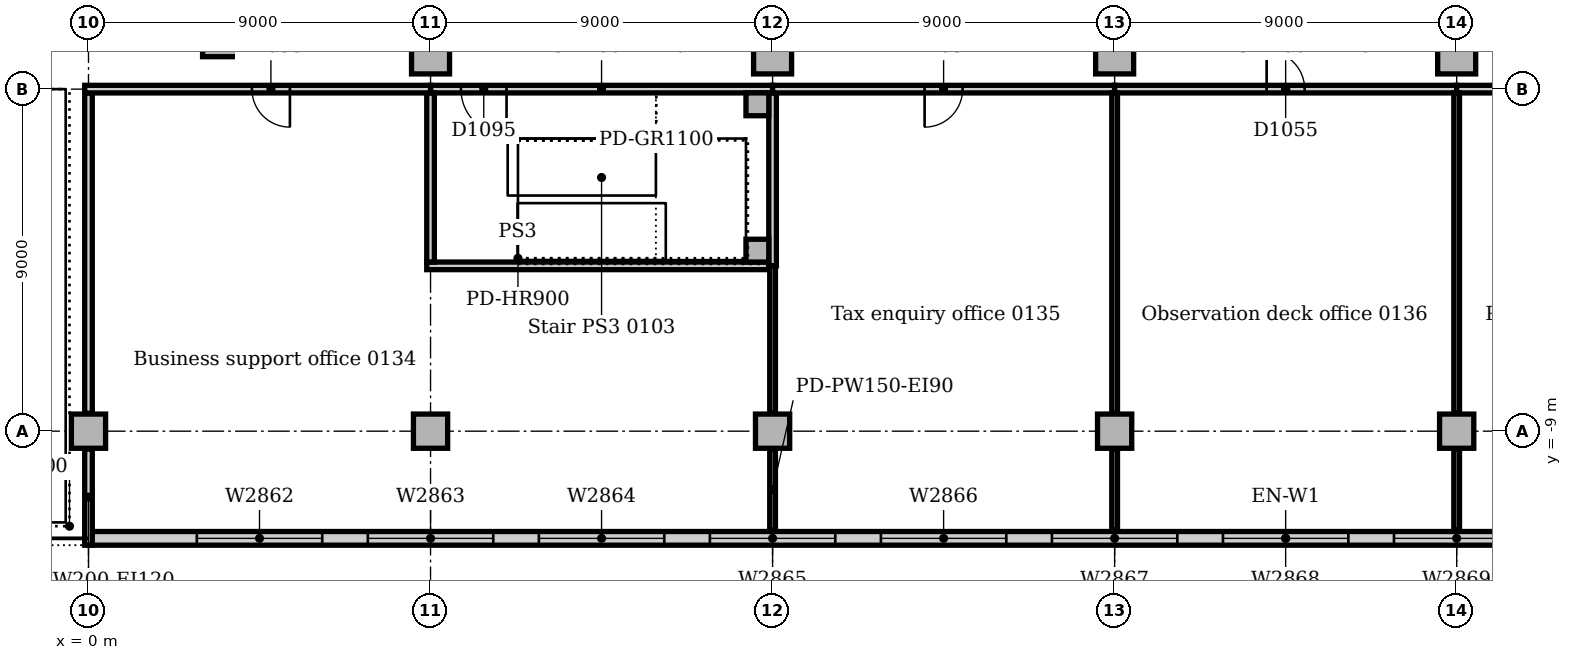
"""IFC4 building model, lengths in metres.
Left out: names, types, materials, properties, quantities, classifications, styles, units other than length and angle.
Written with IfcOpenShell. Run it as: python <this file> out.ifc"""

import sys

from ifc_helpers import new_model, si_unit, direction, frame, frame_2d, origin, origin_2d, place, context, subcontext, project, spatial, rectangle, extrude, element, fill, save


model = new_model("IFC4")
c1 = context("Model", 3, precision=1e-05, world=origin(), true_north=direction((0.0, 1.0)))
c2 = subcontext(c1, "Body", "Model", "MODEL_VIEW")
j1 = project(units=[si_unit("LENGTHUNIT", "METRE"), si_unit("PLANEANGLEUNIT", "RADIAN")], contexts=[c1])
p1 = place(None, origin())
s1 = spatial("IfcSite", under=j1, at=p1, CompositionType="ELEMENT")
p2 = place(p1, origin())
s2 = spatial("IfcBuilding", under=s1, at=p2, CompositionType="ELEMENT")
p3 = place(p2, frame((0.0, 0.0, 6.0)))
s3 = spatial("IfcBuildingStorey", under=s2, at=p3, CompositionType="ELEMENT", Elevation=6.0)
p4 = place(p3, frame((3.602, 1.453, 0.0), z_axis=(0.0, 0.0, 1.0), x_axis=(1.0, 0.0, 0.0)))
e1 = element("IfcColumn", 1, at=p4, inside=s3, PredefinedType="COLUMN", context=c2, shape_type="SweptSolid", body=[
    extrude(rectangle(XDim=1.2, YDim=1.2, at=origin_2d()), origin(), (0.0, 0.0, 1.0), 4.7),
])
for number, where, z_axis, x_axis in (
    (2, (9.0, 0.9, 0.0), (0.0, 0.0, 1.0), (1.0, 0.0, 0.0)),
    (3, (18.0, 0.9, 0.0), (0.0, 0.0, 1.0), (1.0, 0.0, 0.0)),
    (4, (27.0, 0.9, 0.0), (0.0, 0.0, 1.0), (1.0, 0.0, 0.0)),
    (5, (36.0, 0.9, 0.0), (0.0, 0.0, 1.0), (1.0, 0.0, 0.0)),
):
    element("IfcColumn", number, at=place(p3, frame(where, z_axis=z_axis, x_axis=x_axis)), inside=s3, PredefinedType="COLUMN", context=c2, shape_type="SweptSolid", body=[
        extrude(rectangle(XDim=1.0, YDim=1.0, at=origin_2d()), origin(), (0.0, 0.0, 1.0), 4.7),
    ])
for number, where, z_axis, x_axis in (
    (6, (0.0, -9.0, 0.0), (0.0, 0.0, 1.0), (1.0, 0.0, 0.0)),
    (7, (9.0, -9.0, 0.0), (0.0, 0.0, 1.0), (1.0, 0.0, 0.0)),
    (8, (18.0, -9.0, 0.0), (0.0, 0.0, 1.0), (1.0, 0.0, 0.0)),
    (9, (27.0, -9.0, 0.0), (0.0, 0.0, 1.0), (1.0, 0.0, 0.0)),
    (10, (36.0, -9.0, 0.0), (0.0, 0.0, 1.0), (1.0, 0.0, 0.0)),
):
    element("IfcColumn", number, at=place(p3, frame(where, z_axis=z_axis, x_axis=x_axis)), inside=s3, PredefinedType="COLUMN", context=c2, shape_type="SweptSolid", body=[
        extrude(rectangle(XDim=0.9, YDim=0.9, at=origin_2d()), origin(), (0.0, 0.0, 1.0), 4.7),
    ])
p5 = place(p3, frame((0.0, -11.82, 0.0), z_axis=(0.0, 0.0, 1.0), x_axis=(1.0, 0.0, 0.0)))
e11 = element("IfcWall", 11, at=p5, inside=s3, PredefinedType="STANDARD", context=c2, shape_type="SweptSolid", body=[
    extrude(rectangle(XDim=63.0, YDim=0.36, at=frame_2d((31.5, 0.0))), origin(), (0.0, 0.0, 1.0), 4.7),
])
p6 = place(p5, frame((2.85, 0.0, 0.9)))
e12 = element("IfcOpeningElement", 12, at=p6, cuts=e11, PredefinedType="OPENING", context=c2, shape_type="SweptSolid", body=[
    extrude(rectangle(XDim=3.3, YDim=2.4, at=frame_2d((1.65, 1.2))), frame((0.0, 0.19, 0.0), z_axis=(0.0, -1.0, 0.0), x_axis=(1.0, 0.0, 0.0)), (0.0, 0.0, 1.0), 0.38),
])
p7 = place(p5, frame((7.35, 0.0, 0.9)))
e13 = element("IfcOpeningElement", 13, at=p7, cuts=e11, PredefinedType="OPENING", context=c2, shape_type="SweptSolid", body=[
    extrude(rectangle(XDim=3.3, YDim=2.4, at=frame_2d((1.65, 1.2))), frame((0.0, 0.19, 0.0), z_axis=(0.0, -1.0, 0.0), x_axis=(1.0, 0.0, 0.0)), (0.0, 0.0, 1.0), 0.38),
])
p8 = place(p5, frame((11.85, 0.0, 0.9)))
e14 = element("IfcOpeningElement", 14, at=p8, cuts=e11, PredefinedType="OPENING", context=c2, shape_type="SweptSolid", body=[
    extrude(rectangle(XDim=3.3, YDim=2.4, at=frame_2d((1.65, 1.2))), frame((0.0, 0.19, 0.0), z_axis=(0.0, -1.0, 0.0), x_axis=(1.0, 0.0, 0.0)), (0.0, 0.0, 1.0), 0.38),
])
p9 = place(p5, frame((16.35, 0.0, 0.9)))
e15 = element("IfcOpeningElement", 15, at=p9, cuts=e11, PredefinedType="OPENING", context=c2, shape_type="SweptSolid", body=[
    extrude(rectangle(XDim=3.3, YDim=2.4, at=frame_2d((1.65, 1.2))), frame((0.0, 0.19, 0.0), z_axis=(0.0, -1.0, 0.0), x_axis=(1.0, 0.0, 0.0)), (0.0, 0.0, 1.0), 0.38),
])
p10 = place(p5, frame((20.85, 0.0, 0.9)))
e16 = element("IfcOpeningElement", 16, at=p10, cuts=e11, PredefinedType="OPENING", context=c2, shape_type="SweptSolid", body=[
    extrude(rectangle(XDim=3.3, YDim=2.4, at=frame_2d((1.65, 1.2))), frame((0.0, 0.19, 0.0), z_axis=(0.0, -1.0, 0.0), x_axis=(1.0, 0.0, 0.0)), (0.0, 0.0, 1.0), 0.38),
])
p11 = place(p5, frame((25.35, 0.0, 0.9)))
e17 = element("IfcOpeningElement", 17, at=p11, cuts=e11, PredefinedType="OPENING", context=c2, shape_type="SweptSolid", body=[
    extrude(rectangle(XDim=3.3, YDim=2.4, at=frame_2d((1.65, 1.2))), frame((0.0, 0.19, 0.0), z_axis=(0.0, -1.0, 0.0), x_axis=(1.0, 0.0, 0.0)), (0.0, 0.0, 1.0), 0.38),
])
p12 = place(p5, frame((29.85, 0.0, 0.9)))
e18 = element("IfcOpeningElement", 18, at=p12, cuts=e11, PredefinedType="OPENING", context=c2, shape_type="SweptSolid", body=[
    extrude(rectangle(XDim=3.3, YDim=2.4, at=frame_2d((1.65, 1.2))), frame((0.0, 0.19, 0.0), z_axis=(0.0, -1.0, 0.0), x_axis=(1.0, 0.0, 0.0)), (0.0, 0.0, 1.0), 0.38),
])
p13 = place(p5, frame((34.35, 0.0, 0.9)))
e19 = element("IfcOpeningElement", 19, at=p13, cuts=e11, PredefinedType="OPENING", context=c2, shape_type="SweptSolid", body=[
    extrude(rectangle(XDim=3.3, YDim=2.4, at=frame_2d((1.65, 1.2))), frame((0.0, 0.19, 0.0), z_axis=(0.0, -1.0, 0.0), x_axis=(1.0, 0.0, 0.0)), (0.0, 0.0, 1.0), 0.38),
])
p14 = place(p5, frame((38.85, 0.0, 0.9)))
e20 = element("IfcOpeningElement", 20, at=p14, cuts=e11, PredefinedType="OPENING", context=c2, shape_type="SweptSolid", body=[
    extrude(rectangle(XDim=3.3, YDim=2.4, at=frame_2d((1.65, 1.2))), frame((0.0, 0.19, 0.0), z_axis=(0.0, -1.0, 0.0), x_axis=(1.0, 0.0, 0.0)), (0.0, 0.0, 1.0), 0.38),
])
p15 = place(p5, frame((43.35, 0.0, 0.9)))
e21 = element("IfcOpeningElement", 21, at=p15, cuts=e11, PredefinedType="OPENING", context=c2, shape_type="SweptSolid", body=[
    extrude(rectangle(XDim=3.3, YDim=2.4, at=frame_2d((1.65, 1.2))), frame((0.0, 0.19, 0.0), z_axis=(0.0, -1.0, 0.0), x_axis=(1.0, 0.0, 0.0)), (0.0, 0.0, 1.0), 0.38),
])
p16 = place(p5, frame((47.85, 0.0, 0.9)))
e22 = element("IfcOpeningElement", 22, at=p16, cuts=e11, PredefinedType="OPENING", context=c2, shape_type="SweptSolid", body=[
    extrude(rectangle(XDim=3.3, YDim=2.4, at=frame_2d((1.65, 1.2))), frame((0.0, 0.19, 0.0), z_axis=(0.0, -1.0, 0.0), x_axis=(1.0, 0.0, 0.0)), (0.0, 0.0, 1.0), 0.38),
])
p17 = place(p5, frame((52.35, 0.0, 0.9)))
e23 = element("IfcOpeningElement", 23, at=p17, cuts=e11, PredefinedType="OPENING", context=c2, shape_type="SweptSolid", body=[
    extrude(rectangle(XDim=3.3, YDim=2.4, at=frame_2d((1.65, 1.2))), frame((0.0, 0.19, 0.0), z_axis=(0.0, -1.0, 0.0), x_axis=(1.0, 0.0, 0.0)), (0.0, 0.0, 1.0), 0.38),
])
p18 = place(p5, frame((56.85, 0.0, 0.9)))
e24 = element("IfcOpeningElement", 24, at=p18, cuts=e11, PredefinedType="OPENING", context=c2, shape_type="SweptSolid", body=[
    extrude(rectangle(XDim=3.3, YDim=2.4, at=frame_2d((1.65, 1.2))), frame((0.0, 0.19, 0.0), z_axis=(0.0, -1.0, 0.0), x_axis=(1.0, 0.0, 0.0)), (0.0, 0.0, 1.0), 0.38),
])
for number, where, z_axis, x_axis in (
    (25, (17.6, -4.25, 0.0), (0.0, 0.0, 1.0), (1.0, 0.0, 0.0)),
    (26, (17.6, -0.4, 0.0), (0.0, 0.0, 1.0), (1.0, 0.0, 0.0)),
):
    element("IfcColumn", number, at=place(p3, frame(where, z_axis=z_axis, x_axis=x_axis)), inside=s3, PredefinedType="COLUMN", context=c2, shape_type="SweptSolid", body=[
        extrude(rectangle(XDim=0.6, YDim=0.6, at=origin_2d()), origin(), (0.0, 0.0, 1.0), 5.0),
    ])
p19 = place(p3, frame((9.0, 0.0, 0.0), z_axis=(0.0, 0.0, 1.0), x_axis=(1.0, 0.0, 0.0)))
e27 = element("IfcWall", 27, at=p19, inside=s3, PredefinedType="SOLIDWALL", context=c2, shape_type="SweptSolid", body=[
    extrude(rectangle(XDim=9.0, YDim=0.2, at=frame_2d((4.5, 0.0))), origin(), (0.0, 0.0, 1.0), 4.7),
])
p20 = place(p19, frame((0.8, 0.0, 0.0)))
e28 = element("IfcOpeningElement", 28, at=p20, cuts=e27, PredefinedType="OPENING", context=c2, shape_type="SweptSolid", body=[
    extrude(rectangle(XDim=1.2, YDim=2.1, at=frame_2d((0.6, 1.05))), frame((0.0, 0.11, 0.0), z_axis=(0.0, -1.0, 0.0), x_axis=(1.0, 0.0, 0.0)), (0.0, 0.0, 1.0), 0.22),
])
p21 = place(p3, frame((8.9, -4.65, 0.0), z_axis=(0.0, 0.0, 1.0), x_axis=(1.0, 0.0, 0.0)))
e29 = element("IfcWall", 29, at=p21, inside=s3, PredefinedType="SOLIDWALL", context=c2, shape_type="SweptSolid", body=[
    extrude(rectangle(XDim=9.0, YDim=0.2, at=frame_2d((4.5, 0.0))), origin(), (0.0, 0.0, 1.0), 4.7),
])
p22 = place(p3, frame((9.0, -4.55, 0.0), z_axis=(0.0, 0.0, 1.0), x_axis=(0.0, 1.0, 0.0)))
e30 = element("IfcWall", 30, at=p22, inside=s3, PredefinedType="SOLIDWALL", context=c2, shape_type="SweptSolid", body=[
    extrude(rectangle(XDim=4.45, YDim=0.2, at=frame_2d((2.225, 0.0))), origin(), (0.0, 0.0, 1.0), 4.7),
])
p23 = place(p3, frame((18.0, -4.65, 0.0), z_axis=(0.0, 0.0, 1.0), x_axis=(0.0, 1.0, 0.0)))
e31 = element("IfcWall", 31, at=p23, inside=s3, PredefinedType="SOLIDWALL", context=c2, shape_type="SweptSolid", body=[
    extrude(rectangle(XDim=4.55, YDim=0.2, at=frame_2d((2.275, 0.0))), origin(), (0.0, 0.0, 1.0), 4.7),
])
p24 = place(p3, frame((0.0, -12.0, 0.0), z_axis=(0.0, 0.0, 1.0), x_axis=(0.0, 1.0, 0.0)))
e32 = element("IfcWall", 32, at=p24, inside=s3, PredefinedType="PARTITIONING", context=c2, shape_type="SweptSolid", body=[
    extrude(rectangle(XDim=2.53, YDim=0.2, at=frame_2d((1.265, 0.0))), origin(), (0.0, 0.0, 1.0), 4.7),
])
p25 = place(p3, frame((0.0, -8.53, 0.0), z_axis=(0.0, 0.0, 1.0), x_axis=(0.0, 1.0, 0.0)))
e33 = element("IfcWall", 33, at=p25, inside=s3, PredefinedType="PARTITIONING", context=c2, shape_type="SweptSolid", body=[
    extrude(rectangle(XDim=8.43, YDim=0.2, at=frame_2d((4.215, 0.0))), origin(), (0.0, 0.0, 1.0), 4.7),
])
p26 = place(p3, frame((-0.1, 0.0, 0.0), z_axis=(0.0, 0.0, 1.0), x_axis=(1.0, 0.0, 0.0)))
e34 = element("IfcWall", 34, at=p26, inside=s3, PredefinedType="PARTITIONING", context=c2, shape_type="SweptSolid", body=[
    extrude(rectangle(XDim=9.1, YDim=0.2, at=frame_2d((4.55, 0.0))), origin(), (0.0, 0.0, 1.0), 4.7),
])
p27 = place(p26, frame((4.4, 0.0, 0.0)))
e35 = element("IfcOpeningElement", 35, at=p27, cuts=e34, PredefinedType="OPENING", context=c2, shape_type="SweptSolid", body=[
    extrude(rectangle(XDim=1.0, YDim=2.1, at=frame_2d((0.5, 1.05))), frame((0.0, 0.11, 0.0), z_axis=(0.0, -1.0, 0.0), x_axis=(1.0, 0.0, 0.0)), (0.0, 0.0, 1.0), 0.22),
])
p28 = place(p3, frame((18.0, 0.0, 0.0), z_axis=(0.0, 0.0, 1.0), x_axis=(1.0, 0.0, 0.0)))
e36 = element("IfcWall", 36, at=p28, inside=s3, PredefinedType="PARTITIONING", context=c2, shape_type="SweptSolid", body=[
    extrude(rectangle(XDim=9.0, YDim=0.2, at=frame_2d((4.5, 0.0))), origin(), (0.0, 0.0, 1.0), 4.7),
])
p29 = place(p28, frame((4.0, 0.0, 0.0)))
e37 = element("IfcOpeningElement", 37, at=p29, cuts=e36, PredefinedType="OPENING", context=c2, shape_type="SweptSolid", body=[
    extrude(rectangle(XDim=1.0, YDim=2.1, at=frame_2d((0.5, 1.05))), frame((0.0, 0.11, 0.0), z_axis=(0.0, -1.0, 0.0), x_axis=(1.0, 0.0, 0.0)), (0.0, 0.0, 1.0), 0.22),
])
p30 = place(p3, frame((27.0, 0.0, 0.0), z_axis=(0.0, 0.0, 1.0), x_axis=(1.0, 0.0, 0.0)))
e38 = element("IfcWall", 38, at=p30, inside=s3, PredefinedType="PARTITIONING", context=c2, shape_type="SweptSolid", body=[
    extrude(rectangle(XDim=9.0, YDim=0.2, at=frame_2d((4.5, 0.0))), origin(), (0.0, 0.0, 1.0), 4.7),
])
p31 = place(p30, frame((4.0, 0.0, 0.0)))
e39 = element("IfcOpeningElement", 39, at=p31, cuts=e38, PredefinedType="OPENING", context=c2, shape_type="SweptSolid", body=[
    extrude(rectangle(XDim=1.0, YDim=2.1, at=frame_2d((0.5, 1.05))), frame((0.0, 0.11, 0.0), z_axis=(0.0, -1.0, 0.0), x_axis=(1.0, 0.0, 0.0)), (0.0, 0.0, 1.0), 0.22),
])
p32 = place(p3, frame((36.0, 0.0, 0.0), z_axis=(0.0, 0.0, 1.0), x_axis=(1.0, 0.0, 0.0)))
e40 = element("IfcWall", 40, at=p32, inside=s3, PredefinedType="PARTITIONING", context=c2, shape_type="SweptSolid", body=[
    extrude(rectangle(XDim=9.0, YDim=0.2, at=frame_2d((4.5, 0.0))), origin(), (0.0, 0.0, 1.0), 4.7),
])
p33 = place(p32, frame((4.0, 0.0, 0.0)))
e41 = element("IfcOpeningElement", 41, at=p33, cuts=e40, PredefinedType="OPENING", context=c2, shape_type="SweptSolid", body=[
    extrude(rectangle(XDim=1.0, YDim=2.1, at=frame_2d((0.5, 1.05))), frame((0.0, 0.11, 0.0), z_axis=(0.0, -1.0, 0.0), x_axis=(1.0, 0.0, 0.0)), (0.0, 0.0, 1.0), 0.22),
])
p34 = place(p3, frame((18.0, -11.6, 0.0), z_axis=(0.0, 0.0, 1.0), x_axis=(0.0, 1.0, 0.0)))
e42 = element("IfcWall", 42, at=p34, inside=s3, PredefinedType="PARTITIONING", context=c2, shape_type="SweptSolid", body=[
    extrude(rectangle(XDim=2.13, YDim=0.15, at=frame_2d((1.065, 0.0))), origin(), (0.0, 0.0, 1.0), 4.7),
])
p35 = place(p3, frame((18.0, -8.53, 0.0), z_axis=(0.0, 0.0, 1.0), x_axis=(0.0, 1.0, 0.0)))
e43 = element("IfcWall", 43, at=p35, inside=s3, PredefinedType="PARTITIONING", context=c2, shape_type="SweptSolid", body=[
    extrude(rectangle(XDim=3.88, YDim=0.15, at=frame_2d((1.94, 0.0))), origin(), (0.0, 0.0, 1.0), 4.7),
])
p36 = place(p3, frame((27.0, -11.6, 0.0), z_axis=(0.0, 0.0, 1.0), x_axis=(0.0, 1.0, 0.0)))
e44 = element("IfcWall", 44, at=p36, inside=s3, PredefinedType="PARTITIONING", context=c2, shape_type="SweptSolid", body=[
    extrude(rectangle(XDim=2.13, YDim=0.15, at=frame_2d((1.065, 0.0))), origin(), (0.0, 0.0, 1.0), 4.7),
])
p37 = place(p3, frame((27.0, -8.53, 0.0), z_axis=(0.0, 0.0, 1.0), x_axis=(0.0, 1.0, 0.0)))
e45 = element("IfcWall", 45, at=p37, inside=s3, PredefinedType="PARTITIONING", context=c2, shape_type="SweptSolid", body=[
    extrude(rectangle(XDim=8.43, YDim=0.15, at=frame_2d((4.215, 0.0))), origin(), (0.0, 0.0, 1.0), 4.7),
])
p38 = place(p3, frame((36.0, -11.6, 0.0), z_axis=(0.0, 0.0, 1.0), x_axis=(0.0, 1.0, 0.0)))
e46 = element("IfcWall", 46, at=p38, inside=s3, PredefinedType="PARTITIONING", context=c2, shape_type="SweptSolid", body=[
    extrude(rectangle(XDim=2.13, YDim=0.15, at=frame_2d((1.065, 0.0))), origin(), (0.0, 0.0, 1.0), 4.7),
])
p39 = place(p3, frame((36.0, -8.53, 0.0), z_axis=(0.0, 0.0, 1.0), x_axis=(0.0, 1.0, 0.0)))
e47 = element("IfcWall", 47, at=p39, inside=s3, PredefinedType="PARTITIONING", context=c2, shape_type="SweptSolid", body=[
    extrude(rectangle(XDim=8.43, YDim=0.15, at=frame_2d((4.215, 0.0))), origin(), (0.0, 0.0, 1.0), 4.7),
])
p40 = place(p6, origin())
e48 = element("IfcWindow", 48, at=p40, inside=s3, PartitioningType="SINGLE_PANEL", PredefinedType="WINDOW", context=c2, shape_type="SweptSolid", body=[
    extrude(rectangle(XDim=3.3, YDim=2.4, at=frame_2d((1.65, 1.2))), frame((0.0, 0.13, 0.0), z_axis=(0.0, -1.0, 0.0), x_axis=(1.0, 0.0, 0.0)), (0.0, 0.0, 1.0), 0.06),
])
fill(e12, e48)
p41 = place(p7, origin())
e49 = element("IfcWindow", 49, at=p41, inside=s3, PartitioningType="SINGLE_PANEL", PredefinedType="WINDOW", context=c2, shape_type="SweptSolid", body=[
    extrude(rectangle(XDim=3.3, YDim=2.4, at=frame_2d((1.65, 1.2))), frame((0.0, 0.13, 0.0), z_axis=(0.0, -1.0, 0.0), x_axis=(1.0, 0.0, 0.0)), (0.0, 0.0, 1.0), 0.06),
])
fill(e13, e49)
p42 = place(p8, origin())
e50 = element("IfcWindow", 50, at=p42, inside=s3, PartitioningType="SINGLE_PANEL", PredefinedType="WINDOW", context=c2, shape_type="SweptSolid", body=[
    extrude(rectangle(XDim=3.3, YDim=2.4, at=frame_2d((1.65, 1.2))), frame((0.0, 0.13, 0.0), z_axis=(0.0, -1.0, 0.0), x_axis=(1.0, 0.0, 0.0)), (0.0, 0.0, 1.0), 0.06),
])
fill(e14, e50)
p43 = place(p9, origin())
e51 = element("IfcWindow", 51, at=p43, inside=s3, PartitioningType="SINGLE_PANEL", PredefinedType="WINDOW", context=c2, shape_type="SweptSolid", body=[
    extrude(rectangle(XDim=3.3, YDim=2.4, at=frame_2d((1.65, 1.2))), frame((0.0, 0.13, 0.0), z_axis=(0.0, -1.0, 0.0), x_axis=(1.0, 0.0, 0.0)), (0.0, 0.0, 1.0), 0.06),
])
fill(e15, e51)
p44 = place(p10, origin())
e52 = element("IfcWindow", 52, at=p44, inside=s3, PartitioningType="SINGLE_PANEL", PredefinedType="WINDOW", context=c2, shape_type="SweptSolid", body=[
    extrude(rectangle(XDim=3.3, YDim=2.4, at=frame_2d((1.65, 1.2))), frame((0.0, 0.13, 0.0), z_axis=(0.0, -1.0, 0.0), x_axis=(1.0, 0.0, 0.0)), (0.0, 0.0, 1.0), 0.06),
])
fill(e16, e52)
p45 = place(p11, origin())
e53 = element("IfcWindow", 53, at=p45, inside=s3, PartitioningType="SINGLE_PANEL", PredefinedType="WINDOW", context=c2, shape_type="SweptSolid", body=[
    extrude(rectangle(XDim=3.3, YDim=2.4, at=frame_2d((1.65, 1.2))), frame((0.0, 0.13, 0.0), z_axis=(0.0, -1.0, 0.0), x_axis=(1.0, 0.0, 0.0)), (0.0, 0.0, 1.0), 0.06),
])
fill(e17, e53)
p46 = place(p12, origin())
e54 = element("IfcWindow", 54, at=p46, inside=s3, PartitioningType="SINGLE_PANEL", PredefinedType="WINDOW", context=c2, shape_type="SweptSolid", body=[
    extrude(rectangle(XDim=3.3, YDim=2.4, at=frame_2d((1.65, 1.2))), frame((0.0, 0.13, 0.0), z_axis=(0.0, -1.0, 0.0), x_axis=(1.0, 0.0, 0.0)), (0.0, 0.0, 1.0), 0.06),
])
fill(e18, e54)
p47 = place(p13, origin())
e55 = element("IfcWindow", 55, at=p47, inside=s3, PartitioningType="SINGLE_PANEL", PredefinedType="WINDOW", context=c2, shape_type="SweptSolid", body=[
    extrude(rectangle(XDim=3.3, YDim=2.4, at=frame_2d((1.65, 1.2))), frame((0.0, 0.13, 0.0), z_axis=(0.0, -1.0, 0.0), x_axis=(1.0, 0.0, 0.0)), (0.0, 0.0, 1.0), 0.06),
])
fill(e19, e55)
p48 = place(p27, frame((1.0, 0.0, 0.0), z_axis=(0.0, 0.0, 1.0), x_axis=(-1.0, 0.0, 0.0)))
e56 = element("IfcDoor", 56, at=p48, inside=s3, OperationType="SINGLE_SWING_LEFT", PredefinedType="DOOR", context=c2, shape_type="SweptSolid", body=[
    extrude(rectangle(XDim=1.0, YDim=2.1, at=frame_2d((0.5, 1.05))), frame((0.0, 0.025, 0.0), z_axis=(0.0, -1.0, 0.0), x_axis=(1.0, 0.0, 0.0)), (0.0, 0.0, 1.0), 0.05),
])
fill(e35, e56)
p49 = place(p29, frame((1.0, 0.0, 0.0), z_axis=(0.0, 0.0, 1.0), x_axis=(-1.0, 0.0, 0.0)))
e57 = element("IfcDoor", 57, at=p49, inside=s3, OperationType="SINGLE_SWING_RIGHT", PredefinedType="DOOR", context=c2, shape_type="SweptSolid", body=[
    extrude(rectangle(XDim=1.0, YDim=2.1, at=frame_2d((0.5, 1.05))), frame((0.0, 0.025, 0.0), z_axis=(0.0, -1.0, 0.0), x_axis=(1.0, 0.0, 0.0)), (0.0, 0.0, 1.0), 0.05),
])
fill(e37, e57)
p50 = place(p31, origin())
e58 = element("IfcDoor", 58, at=p50, inside=s3, OperationType="SINGLE_SWING_LEFT", PredefinedType="DOOR", context=c2, shape_type="SweptSolid", body=[
    extrude(rectangle(XDim=1.0, YDim=2.1, at=frame_2d((0.5, 1.05))), frame((0.0, 0.025, 0.0), z_axis=(0.0, -1.0, 0.0), x_axis=(1.0, 0.0, 0.0)), (0.0, 0.0, 1.0), 0.05),
])
fill(e39, e58)
p51 = place(p20, frame((1.2, 0.0, 0.0), z_axis=(0.0, 0.0, 1.0), x_axis=(-1.0, 0.0, 0.0)))
e59 = element("IfcDoor", 59, at=p51, inside=s3, OperationType="SINGLE_SWING_LEFT", PredefinedType="DOOR", context=c2, shape_type="SweptSolid", body=[
    extrude(rectangle(XDim=1.2, YDim=2.1, at=frame_2d((0.6, 1.05))), frame((0.0, 0.025, 0.0), z_axis=(0.0, -1.0, 0.0), x_axis=(1.0, 0.0, 0.0)), (0.0, 0.0, 1.0), 0.05),
])
fill(e28, e59)
save(model, sys.argv[1])
